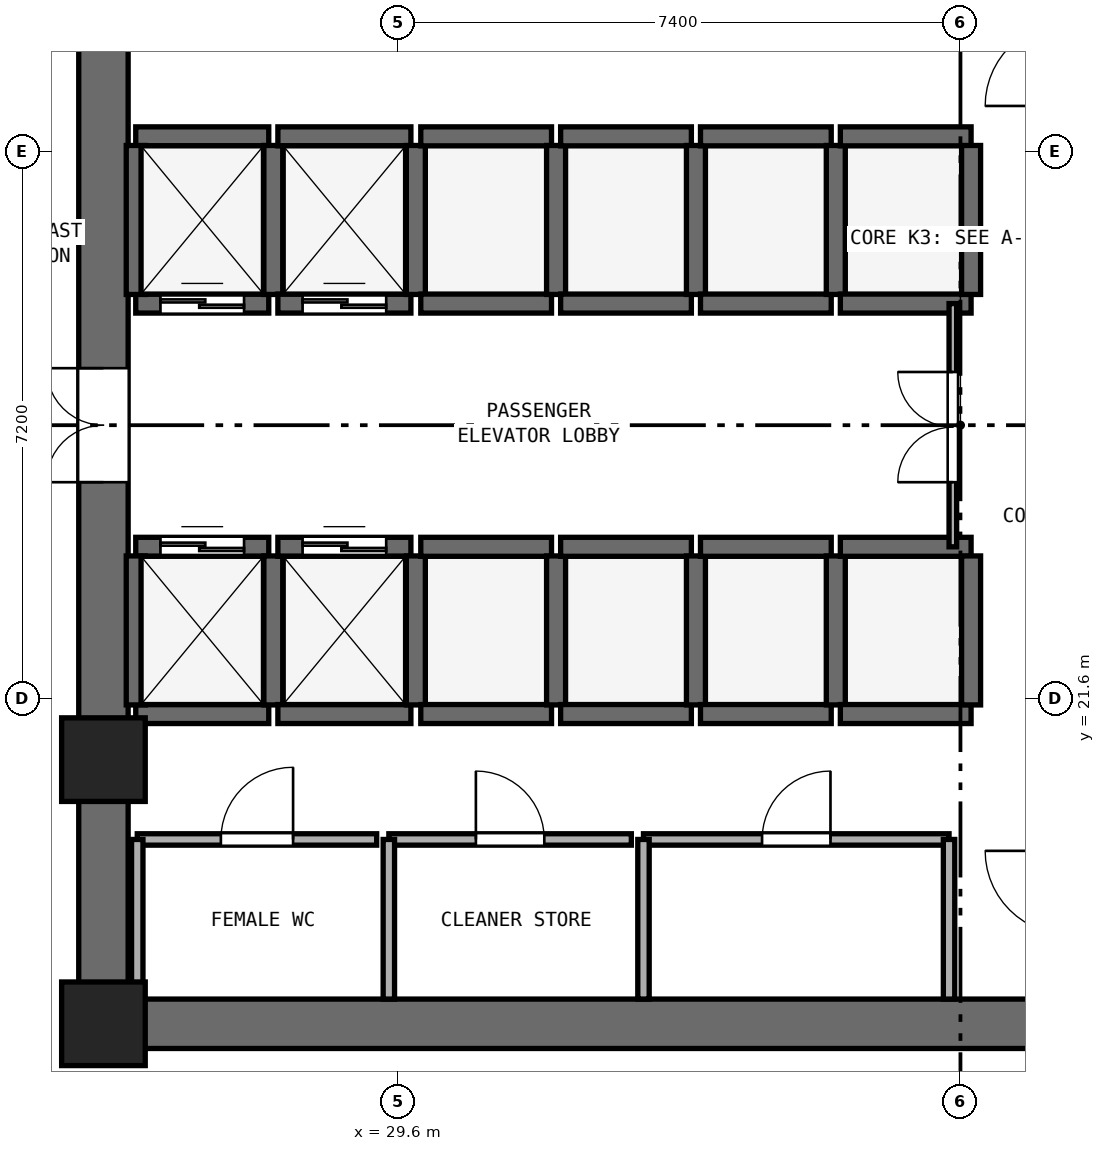
"""IFC4 building model, lengths in metres.
Left out: names, types, materials, properties, quantities, classifications, styles, units other than length and angle.
Written with IfcOpenShell. Run it as: python <this file> out.ifc"""

import sys

from ifc_helpers import new_model, si_unit, direction, frame, frame_2d, origin, origin_2d, place, context, subcontext, project, spatial, rectangle, extrude, element, fill, save


model = new_model("IFC4")
c1 = context("Model", 3, precision=1e-05, world=origin(), true_north=direction((0.0, 1.0)))
c2 = subcontext(c1, "Body", "Model", "MODEL_VIEW")
j1 = project(units=[si_unit("LENGTHUNIT", "METRE"), si_unit("PLANEANGLEUNIT", "RADIAN")], contexts=[c1])
p1 = place(None, origin())
s1 = spatial("IfcSite", under=j1, at=p1, CompositionType="ELEMENT")
p2 = place(p1, origin())
s2 = spatial("IfcBuilding", under=s1, at=p2, CompositionType="ELEMENT")
p3 = place(p2, frame((0.0, 0.0, 40.2)))
s3 = spatial("IfcBuildingStorey", under=s2, at=p3, CompositionType="ELEMENT", Elevation=40.2)
p4 = place(p3, frame((25.4, 17.325, 0.0), z_axis=(0.0, 0.0, 1.0), x_axis=(1.0, 0.0, 0.0)))
e1 = element("IfcWall", 1, at=p4, inside=s3, PredefinedType="SHEAR", context=c2, shape_type="SweptSolid", body=[
    extrude(rectangle(XDim=23.2, YDim=0.65, at=frame_2d((11.6, 0.0))), origin(), (0.0, 0.0, 1.0), 3.525),
])
p5 = place(p3, frame((25.725, 17.65, 0.0), z_axis=(0.0, 0.0, 1.0), x_axis=(0.0, 1.0, 0.0)))
e2 = element("IfcWall", 2, at=p5, inside=s3, PredefinedType="SHEAR", context=c2, shape_type="SweptSolid", body=[
    extrude(rectangle(XDim=15.1, YDim=0.65, at=frame_2d((7.55, 0.0))), origin(), (0.0, 0.0, 1.0), 3.525),
])
p6 = place(p5, frame((6.8, 0.0, 0.0)))
e3 = element("IfcOpeningElement", 3, at=p6, cuts=e2, PredefinedType="OPENING", context=c2, shape_type="SweptSolid", body=[
    extrude(rectangle(XDim=1.5, YDim=2.15, at=frame_2d((0.75, 1.075))), frame((0.0, 0.335, 0.0), z_axis=(0.0, -1.0, 0.0), x_axis=(1.0, 0.0, 0.0)), (0.0, 0.0, 1.0), 0.67),
])
for number, where, z_axis, x_axis in (
    (4, (25.725, 17.325, 0.0), (0.0, 0.0, 1.0), (1.0, 0.0, 0.0)),
    (5, (25.725, 20.8, 0.0), (0.0, 0.0, 1.0), (1.0, 0.0, 0.0)),
):
    element("IfcColumn", number, at=place(p3, frame(where, z_axis=z_axis, x_axis=x_axis)), inside=s3, PredefinedType="PILASTER", context=c2, shape_type="SweptSolid", body=[
        extrude(rectangle(XDim=1.1, YDim=1.1, at=origin_2d()), origin(), (0.0, 0.0, 1.0), 3.8),
    ])
p7 = place(p3, frame((26.15, 26.8, 0.0), z_axis=(0.0, 0.0, 1.0), x_axis=(1.0, 0.0, 0.0)))
e6 = element("IfcWall", 6, at=p7, inside=s3, PredefinedType="SHEAR", context=c2, shape_type="SweptSolid", body=[
    extrude(rectangle(XDim=1.75, YDim=0.25, at=frame_2d((0.875, 0.0))), origin(), (0.0, 0.0, 1.0), 3.525),
])
p8 = place(p7, frame((0.325, 0.0, 0.0)))
e7 = element("IfcOpeningElement", 7, at=p8, cuts=e6, PredefinedType="OPENING", context=c2, shape_type="SweptSolid", body=[
    extrude(rectangle(XDim=1.1, YDim=2.15, at=frame_2d((0.55, 1.075))), frame((0.0, 0.135, 0.0), z_axis=(0.0, -1.0, 0.0), x_axis=(1.0, 0.0, 0.0)), (0.0, 0.0, 1.0), 0.27),
])
p9 = place(p3, frame((26.15, 29.0, 0.0), z_axis=(0.0, 0.0, 1.0), x_axis=(1.0, 0.0, 0.0)))
e8 = element("IfcWall", 8, at=p9, inside=s3, PredefinedType="SHEAR", context=c2, shape_type="SweptSolid", body=[
    extrude(rectangle(XDim=1.75, YDim=0.25, at=frame_2d((0.875, 0.0))), origin(), (0.0, 0.0, 1.0), 3.525),
])
for number, where, z_axis, x_axis in (
    (9, (26.15, 26.92, 0.0), (0.0, 0.0, 1.0), (0.0, 1.0, 0.0)),
    (10, (27.96, 26.92, 0.0), (0.0, 0.0, 1.0), (0.0, 1.0, 0.0)),
):
    element("IfcWall", number, at=place(p3, frame(where, z_axis=z_axis, x_axis=x_axis)), inside=s3, PredefinedType="SHEAR", context=c2, shape_type="SweptSolid", body=[
        extrude(rectangle(XDim=1.96, YDim=0.25, at=frame_2d((0.98, 0.0))), origin(), (0.0, 0.0, 1.0), 3.525),
    ])
p10 = place(p3, frame((28.02, 26.8, 0.0), z_axis=(0.0, 0.0, 1.0), x_axis=(1.0, 0.0, 0.0)))
e11 = element("IfcWall", 11, at=p10, inside=s3, PredefinedType="SHEAR", context=c2, shape_type="SweptSolid", body=[
    extrude(rectangle(XDim=1.75, YDim=0.25, at=frame_2d((0.875, 0.0))), origin(), (0.0, 0.0, 1.0), 3.525),
])
p11 = place(p10, frame((0.325, 0.0, 0.0)))
e12 = element("IfcOpeningElement", 12, at=p11, cuts=e11, PredefinedType="OPENING", context=c2, shape_type="SweptSolid", body=[
    extrude(rectangle(XDim=1.1, YDim=2.15, at=frame_2d((0.55, 1.075))), frame((0.0, 0.135, 0.0), z_axis=(0.0, -1.0, 0.0), x_axis=(1.0, 0.0, 0.0)), (0.0, 0.0, 1.0), 0.27),
])
p12 = place(p3, frame((28.02, 29.0, 0.0), z_axis=(0.0, 0.0, 1.0), x_axis=(1.0, 0.0, 0.0)))
e13 = element("IfcWall", 13, at=p12, inside=s3, PredefinedType="SHEAR", context=c2, shape_type="SweptSolid", body=[
    extrude(rectangle(XDim=1.75, YDim=0.25, at=frame_2d((0.875, 0.0))), origin(), (0.0, 0.0, 1.0), 3.525),
])
p13 = place(p3, frame((29.835, 26.92, 0.0), z_axis=(0.0, 0.0, 1.0), x_axis=(0.0, 1.0, 0.0)))
e14 = element("IfcWall", 14, at=p13, inside=s3, PredefinedType="SHEAR", context=c2, shape_type="SweptSolid", body=[
    extrude(rectangle(XDim=1.96, YDim=0.25, at=frame_2d((0.98, 0.0))), origin(), (0.0, 0.0, 1.0), 3.525),
])
p14 = place(p3, frame((26.15, 21.4, 0.0), z_axis=(0.0, 0.0, 1.0), x_axis=(1.0, 0.0, 0.0)))
e15 = element("IfcWall", 15, at=p14, inside=s3, PredefinedType="SHEAR", context=c2, shape_type="SweptSolid", body=[
    extrude(rectangle(XDim=1.75, YDim=0.25, at=frame_2d((0.875, 0.0))), origin(), (0.0, 0.0, 1.0), 3.525),
])
p15 = place(p3, frame((26.15, 23.6, 0.0), z_axis=(0.0, 0.0, 1.0), x_axis=(1.0, 0.0, 0.0)))
e16 = element("IfcWall", 16, at=p15, inside=s3, PredefinedType="SHEAR", context=c2, shape_type="SweptSolid", body=[
    extrude(rectangle(XDim=1.75, YDim=0.25, at=frame_2d((0.875, 0.0))), origin(), (0.0, 0.0, 1.0), 3.525),
])
p16 = place(p15, frame((0.325, 0.0, 0.0)))
e17 = element("IfcOpeningElement", 17, at=p16, cuts=e16, PredefinedType="OPENING", context=c2, shape_type="SweptSolid", body=[
    extrude(rectangle(XDim=1.1, YDim=2.15, at=frame_2d((0.55, 1.075))), frame((0.0, 0.135, 0.0), z_axis=(0.0, -1.0, 0.0), x_axis=(1.0, 0.0, 0.0)), (0.0, 0.0, 1.0), 0.27),
])
for number, where, z_axis, x_axis in (
    (18, (26.15, 21.52, 0.0), (0.0, 0.0, 1.0), (0.0, 1.0, 0.0)),
    (19, (27.96, 21.52, 0.0), (0.0, 0.0, 1.0), (0.0, 1.0, 0.0)),
):
    element("IfcWall", number, at=place(p3, frame(where, z_axis=z_axis, x_axis=x_axis)), inside=s3, PredefinedType="SHEAR", context=c2, shape_type="SweptSolid", body=[
        extrude(rectangle(XDim=1.96, YDim=0.25, at=frame_2d((0.98, 0.0))), origin(), (0.0, 0.0, 1.0), 3.525),
    ])
p17 = place(p3, frame((28.02, 21.4, 0.0), z_axis=(0.0, 0.0, 1.0), x_axis=(1.0, 0.0, 0.0)))
e20 = element("IfcWall", 20, at=p17, inside=s3, PredefinedType="SHEAR", context=c2, shape_type="SweptSolid", body=[
    extrude(rectangle(XDim=1.75, YDim=0.25, at=frame_2d((0.875, 0.0))), origin(), (0.0, 0.0, 1.0), 3.525),
])
p18 = place(p3, frame((28.02, 23.6, 0.0), z_axis=(0.0, 0.0, 1.0), x_axis=(1.0, 0.0, 0.0)))
e21 = element("IfcWall", 21, at=p18, inside=s3, PredefinedType="SHEAR", context=c2, shape_type="SweptSolid", body=[
    extrude(rectangle(XDim=1.75, YDim=0.25, at=frame_2d((0.875, 0.0))), origin(), (0.0, 0.0, 1.0), 3.525),
])
p19 = place(p18, frame((0.325, 0.0, 0.0)))
e22 = element("IfcOpeningElement", 22, at=p19, cuts=e21, PredefinedType="OPENING", context=c2, shape_type="SweptSolid", body=[
    extrude(rectangle(XDim=1.1, YDim=2.15, at=frame_2d((0.55, 1.075))), frame((0.0, 0.135, 0.0), z_axis=(0.0, -1.0, 0.0), x_axis=(1.0, 0.0, 0.0)), (0.0, 0.0, 1.0), 0.27),
])
p20 = place(p3, frame((29.835, 21.52, 0.0), z_axis=(0.0, 0.0, 1.0), x_axis=(0.0, 1.0, 0.0)))
e23 = element("IfcWall", 23, at=p20, inside=s3, PredefinedType="SHEAR", context=c2, shape_type="SweptSolid", body=[
    extrude(rectangle(XDim=1.96, YDim=0.25, at=frame_2d((0.98, 0.0))), origin(), (0.0, 0.0, 1.0), 3.525),
])
for number, where, z_axis, x_axis in (
    (24, (29.9, 21.4, 0.0), (0.0, 0.0, 1.0), (1.0, 0.0, 0.0)),
    (25, (29.9, 23.6, 0.0), (0.0, 0.0, 1.0), (1.0, 0.0, 0.0)),
):
    element("IfcWall", number, at=place(p3, frame(where, z_axis=z_axis, x_axis=x_axis)), inside=s3, PredefinedType="SHEAR", context=c2, shape_type="SweptSolid", body=[
        extrude(rectangle(XDim=1.72, YDim=0.25, at=frame_2d((0.86, 0.0))), origin(), (0.0, 0.0, 1.0), 3.525),
    ])
p21 = place(p3, frame((31.68, 21.52, 0.0), z_axis=(0.0, 0.0, 1.0), x_axis=(0.0, 1.0, 0.0)))
e26 = element("IfcWall", 26, at=p21, inside=s3, PredefinedType="SHEAR", context=c2, shape_type="SweptSolid", body=[
    extrude(rectangle(XDim=1.96, YDim=0.25, at=frame_2d((0.98, 0.0))), origin(), (0.0, 0.0, 1.0), 3.525),
])
for number, where, z_axis, x_axis in (
    (27, (31.74, 21.4, 0.0), (0.0, 0.0, 1.0), (1.0, 0.0, 0.0)),
    (28, (31.74, 23.6, 0.0), (0.0, 0.0, 1.0), (1.0, 0.0, 0.0)),
):
    element("IfcWall", number, at=place(p3, frame(where, z_axis=z_axis, x_axis=x_axis)), inside=s3, PredefinedType="SHEAR", context=c2, shape_type="SweptSolid", body=[
        extrude(rectangle(XDim=1.72, YDim=0.25, at=frame_2d((0.86, 0.0))), origin(), (0.0, 0.0, 1.0), 3.525),
    ])
p22 = place(p3, frame((33.52, 21.52, 0.0), z_axis=(0.0, 0.0, 1.0), x_axis=(0.0, 1.0, 0.0)))
e29 = element("IfcWall", 29, at=p22, inside=s3, PredefinedType="SHEAR", context=c2, shape_type="SweptSolid", body=[
    extrude(rectangle(XDim=1.96, YDim=0.25, at=frame_2d((0.98, 0.0))), origin(), (0.0, 0.0, 1.0), 3.525),
])
for number, where, z_axis, x_axis in (
    (30, (33.58, 21.4, 0.0), (0.0, 0.0, 1.0), (1.0, 0.0, 0.0)),
    (31, (33.58, 23.6, 0.0), (0.0, 0.0, 1.0), (1.0, 0.0, 0.0)),
):
    element("IfcWall", number, at=place(p3, frame(where, z_axis=z_axis, x_axis=x_axis)), inside=s3, PredefinedType="SHEAR", context=c2, shape_type="SweptSolid", body=[
        extrude(rectangle(XDim=1.72, YDim=0.25, at=frame_2d((0.86, 0.0))), origin(), (0.0, 0.0, 1.0), 3.525),
    ])
p23 = place(p3, frame((35.36, 21.52, 0.0), z_axis=(0.0, 0.0, 1.0), x_axis=(0.0, 1.0, 0.0)))
e32 = element("IfcWall", 32, at=p23, inside=s3, PredefinedType="SHEAR", context=c2, shape_type="SweptSolid", body=[
    extrude(rectangle(XDim=1.96, YDim=0.25, at=frame_2d((0.98, 0.0))), origin(), (0.0, 0.0, 1.0), 3.525),
])
for number, where, z_axis, x_axis in (
    (33, (35.42, 21.4, 0.0), (0.0, 0.0, 1.0), (1.0, 0.0, 0.0)),
    (34, (35.42, 23.6, 0.0), (0.0, 0.0, 1.0), (1.0, 0.0, 0.0)),
):
    element("IfcWall", number, at=place(p3, frame(where, z_axis=z_axis, x_axis=x_axis)), inside=s3, PredefinedType="SHEAR", context=c2, shape_type="SweptSolid", body=[
        extrude(rectangle(XDim=1.72, YDim=0.25, at=frame_2d((0.86, 0.0))), origin(), (0.0, 0.0, 1.0), 3.525),
    ])
p24 = place(p3, frame((37.14, 21.52, 0.0), z_axis=(0.0, 0.0, 1.0), x_axis=(0.0, 1.0, 0.0)))
e35 = element("IfcWall", 35, at=p24, inside=s3, PredefinedType="SHEAR", context=c2, shape_type="SweptSolid", body=[
    extrude(rectangle(XDim=1.96, YDim=0.25, at=frame_2d((0.98, 0.0))), origin(), (0.0, 0.0, 1.0), 3.525),
])
for number, where, z_axis, x_axis in (
    (36, (29.9, 26.8, 0.0), (0.0, 0.0, 1.0), (1.0, 0.0, 0.0)),
    (37, (29.9, 29.0, 0.0), (0.0, 0.0, 1.0), (1.0, 0.0, 0.0)),
):
    element("IfcWall", number, at=place(p3, frame(where, z_axis=z_axis, x_axis=x_axis)), inside=s3, PredefinedType="SHEAR", context=c2, shape_type="SweptSolid", body=[
        extrude(rectangle(XDim=1.72, YDim=0.25, at=frame_2d((0.86, 0.0))), origin(), (0.0, 0.0, 1.0), 3.525),
    ])
p25 = place(p3, frame((31.68, 26.92, 0.0), z_axis=(0.0, 0.0, 1.0), x_axis=(0.0, 1.0, 0.0)))
e38 = element("IfcWall", 38, at=p25, inside=s3, PredefinedType="SHEAR", context=c2, shape_type="SweptSolid", body=[
    extrude(rectangle(XDim=1.96, YDim=0.25, at=frame_2d((0.98, 0.0))), origin(), (0.0, 0.0, 1.0), 3.525),
])
for number, where, z_axis, x_axis in (
    (39, (31.74, 26.8, 0.0), (0.0, 0.0, 1.0), (1.0, 0.0, 0.0)),
    (40, (31.74, 29.0, 0.0), (0.0, 0.0, 1.0), (1.0, 0.0, 0.0)),
):
    element("IfcWall", number, at=place(p3, frame(where, z_axis=z_axis, x_axis=x_axis)), inside=s3, PredefinedType="SHEAR", context=c2, shape_type="SweptSolid", body=[
        extrude(rectangle(XDim=1.72, YDim=0.25, at=frame_2d((0.86, 0.0))), origin(), (0.0, 0.0, 1.0), 3.525),
    ])
p26 = place(p3, frame((33.52, 26.92, 0.0), z_axis=(0.0, 0.0, 1.0), x_axis=(0.0, 1.0, 0.0)))
e41 = element("IfcWall", 41, at=p26, inside=s3, PredefinedType="SHEAR", context=c2, shape_type="SweptSolid", body=[
    extrude(rectangle(XDim=1.96, YDim=0.25, at=frame_2d((0.98, 0.0))), origin(), (0.0, 0.0, 1.0), 3.525),
])
for number, where, z_axis, x_axis in (
    (42, (33.58, 26.8, 0.0), (0.0, 0.0, 1.0), (1.0, 0.0, 0.0)),
    (43, (33.58, 29.0, 0.0), (0.0, 0.0, 1.0), (1.0, 0.0, 0.0)),
):
    element("IfcWall", number, at=place(p3, frame(where, z_axis=z_axis, x_axis=x_axis)), inside=s3, PredefinedType="SHEAR", context=c2, shape_type="SweptSolid", body=[
        extrude(rectangle(XDim=1.72, YDim=0.25, at=frame_2d((0.86, 0.0))), origin(), (0.0, 0.0, 1.0), 3.525),
    ])
p27 = place(p3, frame((35.36, 26.92, 0.0), z_axis=(0.0, 0.0, 1.0), x_axis=(0.0, 1.0, 0.0)))
e44 = element("IfcWall", 44, at=p27, inside=s3, PredefinedType="SHEAR", context=c2, shape_type="SweptSolid", body=[
    extrude(rectangle(XDim=1.96, YDim=0.25, at=frame_2d((0.98, 0.0))), origin(), (0.0, 0.0, 1.0), 3.525),
])
for number, where, z_axis, x_axis in (
    (45, (35.42, 26.8, 0.0), (0.0, 0.0, 1.0), (1.0, 0.0, 0.0)),
    (46, (35.42, 29.0, 0.0), (0.0, 0.0, 1.0), (1.0, 0.0, 0.0)),
):
    element("IfcWall", number, at=place(p3, frame(where, z_axis=z_axis, x_axis=x_axis)), inside=s3, PredefinedType="SHEAR", context=c2, shape_type="SweptSolid", body=[
        extrude(rectangle(XDim=1.72, YDim=0.25, at=frame_2d((0.86, 0.0))), origin(), (0.0, 0.0, 1.0), 3.525),
    ])
p28 = place(p3, frame((37.14, 26.92, 0.0), z_axis=(0.0, 0.0, 1.0), x_axis=(0.0, 1.0, 0.0)))
e47 = element("IfcWall", 47, at=p28, inside=s3, PredefinedType="SHEAR", context=c2, shape_type="SweptSolid", body=[
    extrude(rectangle(XDim=1.96, YDim=0.25, at=frame_2d((0.98, 0.0))), origin(), (0.0, 0.0, 1.0), 3.525),
])
p29 = place(p3, frame((26.17, 19.75, 0.0), z_axis=(0.0, 0.0, 1.0), x_axis=(1.0, 0.0, 0.0)))
e48 = element("IfcWall", 48, at=p29, inside=s3, PredefinedType="PARTITIONING", context=c2, shape_type="SweptSolid", body=[
    extrude(rectangle(XDim=3.15, YDim=0.15, at=frame_2d((1.575, 0.0))), origin(), (0.0, 0.0, 1.0), 3.525),
])
p30 = place(p29, frame((1.1, 0.0, 0.0)))
e49 = element("IfcOpeningElement", 49, at=p30, cuts=e48, PredefinedType="OPENING", context=c2, shape_type="SweptSolid", body=[
    extrude(rectangle(XDim=0.95, YDim=2.1, at=frame_2d((0.475, 1.05))), frame((0.0, 0.085, 0.0), z_axis=(0.0, -1.0, 0.0), x_axis=(1.0, 0.0, 0.0)), (0.0, 0.0, 1.0), 0.17),
])
p31 = place(p3, frame((26.17, 17.65, 0.0), z_axis=(0.0, 0.0, 1.0), x_axis=(0.0, 1.0, 0.0)))
e50 = element("IfcWall", 50, at=p31, inside=s3, PredefinedType="PARTITIONING", context=c2, shape_type="SweptSolid", body=[
    extrude(rectangle(XDim=2.1, YDim=0.15, at=frame_2d((1.05, 0.0))), origin(), (0.0, 0.0, 1.0), 3.525),
])
p32 = place(p3, frame((29.48, 19.75, 0.0), z_axis=(0.0, 0.0, 1.0), x_axis=(1.0, 0.0, 0.0)))
e51 = element("IfcWall", 51, at=p32, inside=s3, PredefinedType="PARTITIONING", context=c2, shape_type="SweptSolid", body=[
    extrude(rectangle(XDim=3.19, YDim=0.15, at=frame_2d((1.595, 0.0))), origin(), (0.0, 0.0, 1.0), 3.525),
])
p33 = place(p32, frame((1.145, 0.0, 0.0)))
e52 = element("IfcOpeningElement", 52, at=p33, cuts=e51, PredefinedType="OPENING", context=c2, shape_type="SweptSolid", body=[
    extrude(rectangle(XDim=0.9, YDim=2.1, at=frame_2d((0.45, 1.05))), frame((0.0, 0.085, 0.0), z_axis=(0.0, -1.0, 0.0), x_axis=(1.0, 0.0, 0.0)), (0.0, 0.0, 1.0), 0.17),
])
p34 = place(p3, frame((29.48, 17.65, 0.0), z_axis=(0.0, 0.0, 1.0), x_axis=(0.0, 1.0, 0.0)))
e53 = element("IfcWall", 53, at=p34, inside=s3, PredefinedType="PARTITIONING", context=c2, shape_type="SweptSolid", body=[
    extrude(rectangle(XDim=2.1, YDim=0.15, at=frame_2d((1.05, 0.0))), origin(), (0.0, 0.0, 1.0), 3.525),
])
p35 = place(p3, frame((32.83, 19.75, 0.0), z_axis=(0.0, 0.0, 1.0), x_axis=(1.0, 0.0, 0.0)))
e54 = element("IfcWall", 54, at=p35, inside=s3, PredefinedType="PARTITIONING", context=c2, shape_type="SweptSolid", body=[
    extrude(rectangle(XDim=4.02, YDim=0.15, at=frame_2d((2.01, 0.0))), origin(), (0.0, 0.0, 1.0), 3.525),
])
p36 = place(p35, frame((1.56, 0.0, 0.0)))
e55 = element("IfcOpeningElement", 55, at=p36, cuts=e54, PredefinedType="OPENING", context=c2, shape_type="SweptSolid", body=[
    extrude(rectangle(XDim=0.9, YDim=2.1, at=frame_2d((0.45, 1.05))), frame((0.0, 0.085, 0.0), z_axis=(0.0, -1.0, 0.0), x_axis=(1.0, 0.0, 0.0)), (0.0, 0.0, 1.0), 0.17),
])
for number, where, z_axis, x_axis in (
    (56, (32.83, 17.65, 0.0), (0.0, 0.0, 1.0), (0.0, 1.0, 0.0)),
    (57, (36.85, 17.65, 0.0), (0.0, 0.0, 1.0), (0.0, 1.0, 0.0)),
):
    element("IfcWall", number, at=place(p3, frame(where, z_axis=z_axis, x_axis=x_axis)), inside=s3, PredefinedType="PARTITIONING", context=c2, shape_type="SweptSolid", body=[
        extrude(rectangle(XDim=2.1, YDim=0.15, at=frame_2d((1.05, 0.0))), origin(), (0.0, 0.0, 1.0), 3.525),
    ])
p37 = place(p3, frame((36.9, 23.6, 0.0), z_axis=(0.0, 0.0, 1.0), x_axis=(0.0, 1.0, 0.0)))
e58 = element("IfcWall", 58, at=p37, inside=s3, PredefinedType="PARTITIONING", context=c2, shape_type="SweptSolid", body=[
    extrude(rectangle(XDim=3.2, YDim=0.1, at=frame_2d((1.6, 0.0))), origin(), (0.0, 0.0, 1.0), 3.525),
])
p38 = place(p37, frame((0.85, 0.0, 0.0)))
e59 = element("IfcOpeningElement", 59, at=p38, cuts=e58, PredefinedType="OPENING", context=c2, shape_type="SweptSolid", body=[
    extrude(rectangle(XDim=1.45, YDim=2.12, at=frame_2d((0.725, 1.06))), frame((0.0, 0.06, 0.0), z_axis=(0.0, -1.0, 0.0), x_axis=(1.0, 0.0, 0.0)), (0.0, 0.0, 1.0), 0.12),
])
p39 = place(p8, origin())
e60 = element("IfcDoor", 60, at=p39, inside=s3, OperationType="DOUBLE_DOOR_SLIDING", PredefinedType="DOOR", context=c2, shape_type="SweptSolid", body=[
    extrude(rectangle(XDim=1.1, YDim=2.15, at=frame_2d((0.55, 1.075))), frame((0.0, 0.025, 0.0), z_axis=(0.0, -1.0, 0.0), x_axis=(1.0, 0.0, 0.0)), (0.0, 0.0, 1.0), 0.05),
])
fill(e7, e60)
p40 = place(p11, origin())
e61 = element("IfcDoor", 61, at=p40, inside=s3, OperationType="DOUBLE_DOOR_SLIDING", PredefinedType="DOOR", context=c2, shape_type="SweptSolid", body=[
    extrude(rectangle(XDim=1.1, YDim=2.15, at=frame_2d((0.55, 1.075))), frame((0.0, 0.025, 0.0), z_axis=(0.0, -1.0, 0.0), x_axis=(1.0, 0.0, 0.0)), (0.0, 0.0, 1.0), 0.05),
])
fill(e12, e61)
p41 = place(p16, origin())
e62 = element("IfcDoor", 62, at=p41, inside=s3, OperationType="DOUBLE_DOOR_SLIDING", PredefinedType="DOOR", context=c2, shape_type="SweptSolid", body=[
    extrude(rectangle(XDim=1.1, YDim=2.15, at=frame_2d((0.55, 1.075))), frame((0.0, 0.025, 0.0), z_axis=(0.0, -1.0, 0.0), x_axis=(1.0, 0.0, 0.0)), (0.0, 0.0, 1.0), 0.05),
])
fill(e17, e62)
p42 = place(p19, origin())
e63 = element("IfcDoor", 63, at=p42, inside=s3, OperationType="DOUBLE_DOOR_SLIDING", PredefinedType="DOOR", context=c2, shape_type="SweptSolid", body=[
    extrude(rectangle(XDim=1.1, YDim=2.15, at=frame_2d((0.55, 1.075))), frame((0.0, 0.025, 0.0), z_axis=(0.0, -1.0, 0.0), x_axis=(1.0, 0.0, 0.0)), (0.0, 0.0, 1.0), 0.05),
])
fill(e22, e63)
p43 = place(p6, origin())
e64 = element("IfcDoor", 64, at=p43, inside=s3, OperationType="DOUBLE_DOOR_SINGLE_SWING", PredefinedType="DOOR", context=c2, shape_type="SweptSolid", body=[
    extrude(rectangle(XDim=1.5, YDim=2.15, at=frame_2d((0.75, 1.075))), frame((0.0, 0.025, 0.0), z_axis=(0.0, -1.0, 0.0), x_axis=(1.0, 0.0, 0.0)), (0.0, 0.0, 1.0), 0.05),
])
fill(e3, e64)
p44 = place(p30, origin())
e65 = element("IfcDoor", 65, at=p44, inside=s3, OperationType="SINGLE_SWING_RIGHT", PredefinedType="DOOR", context=c2, shape_type="SweptSolid", body=[
    extrude(rectangle(XDim=0.95, YDim=2.1, at=frame_2d((0.475, 1.05))), frame((0.0, 0.025, 0.0), z_axis=(0.0, -1.0, 0.0), x_axis=(1.0, 0.0, 0.0)), (0.0, 0.0, 1.0), 0.05),
])
fill(e49, e65)
p45 = place(p33, origin())
e66 = element("IfcDoor", 66, at=p45, inside=s3, OperationType="SINGLE_SWING_LEFT", PredefinedType="DOOR", context=c2, shape_type="SweptSolid", body=[
    extrude(rectangle(XDim=0.9, YDim=2.1, at=frame_2d((0.45, 1.05))), frame((0.0, 0.025, 0.0), z_axis=(0.0, -1.0, 0.0), x_axis=(1.0, 0.0, 0.0)), (0.0, 0.0, 1.0), 0.05),
])
fill(e52, e66)
p46 = place(p36, origin())
e67 = element("IfcDoor", 67, at=p46, inside=s3, OperationType="SINGLE_SWING_RIGHT", PredefinedType="DOOR", context=c2, shape_type="SweptSolid", body=[
    extrude(rectangle(XDim=0.9, YDim=2.1, at=frame_2d((0.45, 1.05))), frame((0.0, 0.025, 0.0), z_axis=(0.0, -1.0, 0.0), x_axis=(1.0, 0.0, 0.0)), (0.0, 0.0, 1.0), 0.05),
])
fill(e55, e67)
p47 = place(p38, origin())
e68 = element("IfcDoor", 68, at=p47, inside=s3, OperationType="DOUBLE_DOOR_SINGLE_SWING", PredefinedType="DOOR", context=c2, shape_type="SweptSolid", body=[
    extrude(rectangle(XDim=1.45, YDim=2.12, at=frame_2d((0.725, 1.06))), frame((0.0, 0.025, 0.0), z_axis=(0.0, -1.0, 0.0), x_axis=(1.0, 0.0, 0.0)), (0.0, 0.0, 1.0), 0.05),
])
fill(e59, e68)
save(model, sys.argv[1])
